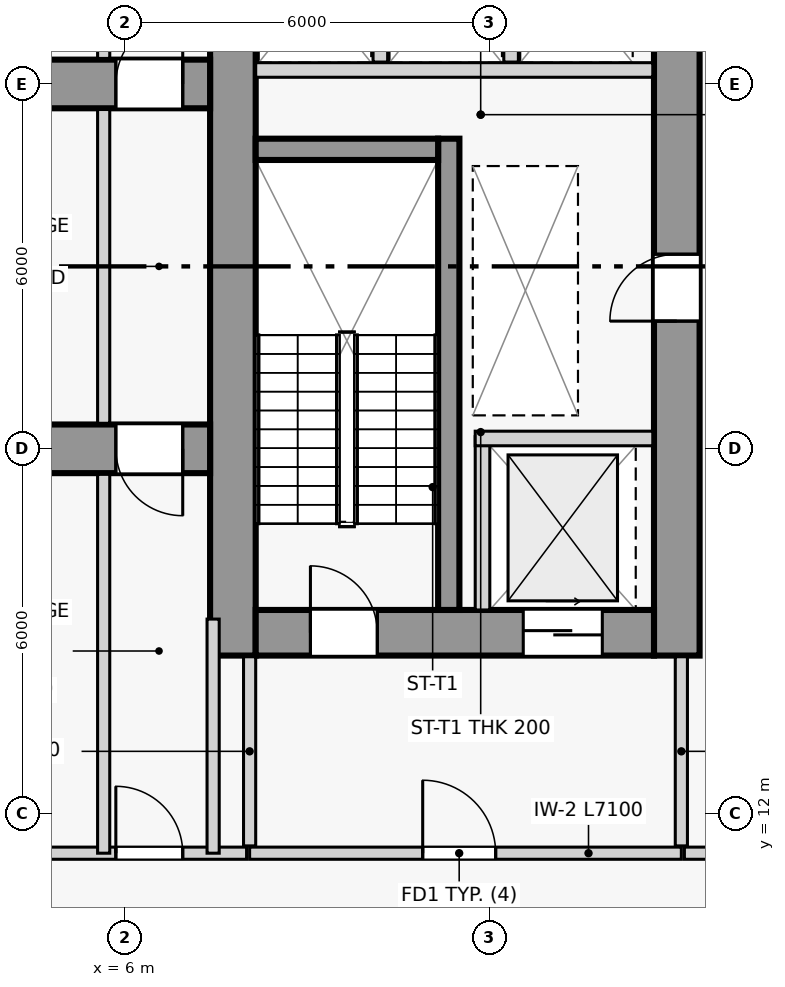
"""IFC4 building model, lengths in metres.
Left out: names, types, materials, properties, quantities, classifications, styles, units other than length and angle.
Written with IfcOpenShell. Run it as: python <this file> out.ifc"""

import sys

from ifc_helpers import new_model, si_unit, direction, frame, frame_2d, origin, place, context, subcontext, project, spatial, rectangle, extrude, source, transform, mapped, element, fill, save


model = new_model("IFC4")
c1 = context("Model", 3, precision=1e-05, world=origin(), true_north=direction((0.0, 1.0)))
c2 = subcontext(c1, "Body", "Model", "MODEL_VIEW")
j1 = project(units=[si_unit("LENGTHUNIT", "METRE"), si_unit("PLANEANGLEUNIT", "RADIAN")], contexts=[c1])
p1 = place(None, origin())
s1 = spatial("IfcSite", under=j1, at=p1, CompositionType="ELEMENT")
p2 = place(p1, origin())
s2 = spatial("IfcBuilding", under=s1, at=p2, CompositionType="ELEMENT")
p3 = place(p2, frame((0.0, 0.0, 148.5)))
s3 = spatial("IfcBuildingStorey", under=s2, at=p3, CompositionType="ELEMENT", Elevation=148.5)
p4 = place(p3, frame((7.775, 14.6, 0.0), z_axis=(0.0, 0.0, 1.0), x_axis=(0.0, 1.0, 0.0)))
e1 = element("IfcWall", 1, at=p4, inside=s3, PredefinedType="SHEAR", context=c2, shape_type="SweptSolid", body=[
    extrude(rectangle(XDim=12.85, YDim=0.75, at=frame_2d((6.425, 0.0))), origin(), (0.0, 0.0, 1.0), 7.2),
])
p5 = place(p3, frame((15.075, 14.6, 0.0), z_axis=(0.0, 0.0, 1.0), x_axis=(0.0, 1.0, 0.0)))
e2 = element("IfcWall", 2, at=p5, inside=s3, PredefinedType="SHEAR", context=c2, shape_type="SweptSolid", body=[
    extrude(rectangle(XDim=12.85, YDim=0.75, at=frame_2d((6.425, 0.0))), origin(), (0.0, 0.0, 1.0), 7.2),
])
p6 = place(p5, frame((5.5, 0.0, 0.0)))
e3 = element("IfcOpeningElement", 3, at=p6, cuts=e2, PredefinedType="OPENING", context=c2, shape_type="SweptSolid", body=[
    extrude(rectangle(XDim=1.1, YDim=2.2, at=frame_2d((0.55, 1.1))), frame((0.0, 0.385, 0.0), z_axis=(0.0, -1.0, 0.0), x_axis=(1.0, 0.0, 0.0)), (0.0, 0.0, 1.0), 0.77),
])
p7 = place(p3, frame((8.15, 14.975, 0.0), z_axis=(0.0, 0.0, 1.0), x_axis=(1.0, 0.0, 0.0)))
e4 = element("IfcWall", 4, at=p7, inside=s3, PredefinedType="SHEAR", context=c2, shape_type="SweptSolid", body=[
    extrude(rectangle(XDim=6.55, YDim=0.75, at=frame_2d((3.275, 0.0))), origin(), (0.0, 0.0, 1.0), 7.2),
])
p8 = place(p7, frame((0.9, 0.0, 0.0)))
e5 = element("IfcOpeningElement", 5, at=p8, cuts=e4, PredefinedType="OPENING", context=c2, shape_type="SweptSolid", body=[
    extrude(rectangle(XDim=1.1, YDim=2.2, at=frame_2d((0.55, 1.1))), frame((0.0, 0.385, 0.0), z_axis=(0.0, -1.0, 0.0), x_axis=(1.0, 0.0, 0.0)), (0.0, 0.0, 1.0), 0.77),
])
p9 = place(p7, frame((4.4, 0.0, 0.0)))
e6 = element("IfcOpeningElement", 6, at=p9, cuts=e4, PredefinedType="OPENING", context=c2, shape_type="SweptSolid", body=[
    extrude(rectangle(XDim=1.3, YDim=2.2, at=frame_2d((0.65, 1.1))), frame((0.0, 0.385, 0.0), z_axis=(0.0, -1.0, 0.0), x_axis=(1.0, 0.0, 0.0)), (0.0, 0.0, 1.0), 0.77),
])
p10 = place(p3, frame((11.325, 15.35, 0.0), z_axis=(0.0, 0.0, 1.0), x_axis=(0.0, 1.0, 0.0)))
e7 = element("IfcWall", 7, at=p10, inside=s3, PredefinedType="SHEAR", context=c2, shape_type="SweptSolid", body=[
    extrude(rectangle(XDim=7.75, YDim=0.35, at=frame_2d((3.875, 0.0))), origin(), (0.0, 0.0, 1.0), 7.2),
])
p11 = place(p3, frame((8.15, 22.925, 0.0), z_axis=(0.0, 0.0, 1.0), x_axis=(1.0, 0.0, 0.0)))
e8 = element("IfcWall", 8, at=p11, inside=s3, PredefinedType="SHEAR", context=c2, shape_type="SweptSolid", body=[
    extrude(rectangle(XDim=3.0, YDim=0.35, at=frame_2d((1.5, 0.0))), origin(), (0.0, 0.0, 1.0), 7.2),
])
p12 = place(p3, frame((0.65, 18.0, 0.0), z_axis=(0.0, 0.0, 1.0), x_axis=(1.0, 0.0, 0.0)))
e9 = element("IfcWall", 9, at=p12, inside=s3, PredefinedType="SOLIDWALL", context=c2, shape_type="SweptSolid", body=[
    extrude(rectangle(XDim=6.75, YDim=0.8, at=frame_2d((3.375, 0.0))), origin(), (0.0, 0.0, 1.0), 6.55),
])
p13 = place(p12, frame((5.2, 0.0, 0.0)))
e10 = element("IfcOpeningElement", 10, at=p13, cuts=e9, PredefinedType="OPENING", context=c2, shape_type="SweptSolid", body=[
    extrude(rectangle(XDim=1.1, YDim=2.2, at=frame_2d((0.55, 1.1))), frame((0.0, 0.41, 0.0), z_axis=(0.0, -1.0, 0.0), x_axis=(1.0, 0.0, 0.0)), (0.0, 0.0, 1.0), 0.82),
])
p14 = place(p3, frame((0.65, 24.0, 0.0), z_axis=(0.0, 0.0, 1.0), x_axis=(1.0, 0.0, 0.0)))
e11 = element("IfcWall", 11, at=p14, inside=s3, PredefinedType="SOLIDWALL", context=c2, shape_type="SweptSolid", body=[
    extrude(rectangle(XDim=6.75, YDim=0.8, at=frame_2d((3.375, 0.0))), origin(), (0.0, 0.0, 1.0), 6.55),
])
p15 = place(p14, frame((5.2, 0.0, 0.0)))
e12 = element("IfcOpeningElement", 12, at=p15, cuts=e11, PredefinedType="OPENING", context=c2, shape_type="SweptSolid", body=[
    extrude(rectangle(XDim=1.1, YDim=2.2, at=frame_2d((0.55, 1.1))), frame((0.0, 0.41, 0.0), z_axis=(0.0, -1.0, 0.0), x_axis=(1.0, 0.0, 0.0)), (0.0, 0.0, 1.0), 0.82),
])
p16 = place(p3, frame((11.88, 15.35, 0.0), z_axis=(0.0, 0.0, 1.0), x_axis=(0.0, 1.0, 0.0)))
e13 = element("IfcWall", 13, at=p16, inside=s3, PredefinedType="PARTITIONING", context=c2, shape_type="SweptSolid", body=[
    extrude(rectangle(XDim=2.85, YDim=0.24, at=frame_2d((1.425, 0.0))), origin(), (0.0, 0.0, 1.0), 6.55),
])
p17 = place(p3, frame((11.76, 18.17, 0.0), z_axis=(0.0, 0.0, 1.0), x_axis=(1.0, 0.0, 0.0)))
e14 = element("IfcWall", 14, at=p17, inside=s3, PredefinedType="PARTITIONING", context=c2, shape_type="SweptSolid", body=[
    extrude(rectangle(XDim=2.92, YDim=0.24, at=frame_2d((1.46, 0.0))), origin(), (0.0, 0.0, 1.0), 6.55),
])
p18 = place(p3, frame((8.05, 11.35, 0.0), z_axis=(0.0, 0.0, 1.0), x_axis=(1.0, 0.0, 0.0)))
e15 = element("IfcWall", 15, at=p18, inside=s3, PredefinedType="PARTITIONING", context=c2, shape_type="SweptSolid", body=[
    extrude(rectangle(XDim=7.1, YDim=0.2, at=frame_2d((3.55, 0.0))), origin(), (0.0, 0.0, 1.0), 4.95),
])
p19 = place(p18, frame((2.846, 0.0, 0.0)))
e16 = element("IfcOpeningElement", 16, at=p19, cuts=e15, PredefinedType="OPENING", context=c2, shape_type="SweptSolid", body=[
    extrude(rectangle(XDim=1.2, YDim=2.2, at=frame_2d((0.6, 1.1))), frame((0.0, 0.11, 0.0), z_axis=(0.0, -1.0, 0.0), x_axis=(1.0, 0.0, 0.0)), (0.0, 0.0, 1.0), 0.22),
])
for number, where, z_axis, x_axis in (
    (17, (8.05, 11.47, 0.0), (0.0, 0.0, 1.0), (0.0, 1.0, 0.0)),
    (18, (15.15, 11.47, 0.0), (0.0, 0.0, 1.0), (0.0, 1.0, 0.0)),
):
    element("IfcWall", number, at=place(p3, frame(where, z_axis=z_axis, x_axis=x_axis)), inside=s3, PredefinedType="PARTITIONING", context=c2, shape_type="SweptSolid", body=[
        extrude(rectangle(XDim=3.11, YDim=0.2, at=frame_2d((1.555, 0.0))), origin(), (0.0, 0.0, 1.0), 6.55),
    ])
p20 = place(p3, frame((8.15, 24.23, 0.0), z_axis=(0.0, 0.0, 1.0), x_axis=(1.0, 0.0, 0.0)))
e19 = element("IfcWall", 19, at=p20, inside=s3, PredefinedType="PARTITIONING", context=c2, shape_type="SweptSolid", body=[
    extrude(rectangle(XDim=6.53, YDim=0.24, at=frame_2d((3.265, 0.0))), origin(), (0.0, 0.0, 1.0), 6.55),
])
for number, where, z_axis, x_axis in (
    (20, (10.2, 24.36, 0.0), (0.0, 0.0, 1.0), (0.0, 1.0, 0.0)),
    (21, (12.35, 24.36, 0.0), (0.0, 0.0, 1.0), (0.0, 1.0, 0.0)),
):
    element("IfcWall", number, at=place(p3, frame(where, z_axis=z_axis, x_axis=x_axis)), inside=s3, PredefinedType="PARTITIONING", context=c2, shape_type="SweptSolid", body=[
        extrude(rectangle(XDim=2.32, YDim=0.24, at=frame_2d((1.16, 0.0))), origin(), (0.0, 0.0, 1.0), 6.55),
    ])
p21 = place(p3, frame((2.2, 11.35, 0.0), z_axis=(0.0, 0.0, 1.0), x_axis=(1.0, 0.0, 0.0)))
e22 = element("IfcWall", 22, at=p21, inside=s3, PredefinedType="PARTITIONING", context=c2, shape_type="SweptSolid", body=[
    extrude(rectangle(XDim=5.8, YDim=0.2, at=frame_2d((2.9, 0.0))), origin(), (0.0, 0.0, 1.0), 4.95),
])
p22 = place(p21, frame((3.65, 0.0, 0.0)))
e23 = element("IfcOpeningElement", 23, at=p22, cuts=e22, PredefinedType="OPENING", context=c2, shape_type="SweptSolid", body=[
    extrude(rectangle(XDim=1.1, YDim=2.2, at=frame_2d((0.55, 1.1))), frame((0.0, 0.11, 0.0), z_axis=(0.0, -1.0, 0.0), x_axis=(1.0, 0.0, 0.0)), (0.0, 0.0, 1.0), 0.22),
])
p23 = place(p3, frame((15.2, 11.35, 0.0), z_axis=(0.0, 0.0, 1.0), x_axis=(1.0, 0.0, 0.0)))
e24 = element("IfcWall", 24, at=p23, inside=s3, PredefinedType="PARTITIONING", context=c2, shape_type="SweptSolid", body=[
    extrude(rectangle(XDim=15.8, YDim=0.2, at=frame_2d((7.9, 0.0))), origin(), (0.0, 0.0, 1.0), 4.95),
])
p24 = place(p3, frame((5.65, 11.35, 0.0), z_axis=(0.0, 0.0, 1.0), x_axis=(0.0, 1.0, 0.0)))
e25 = element("IfcWall", 25, at=p24, inside=s3, PredefinedType="PARTITIONING", context=c2, shape_type="SweptSolid", body=[
    extrude(rectangle(XDim=6.23, YDim=0.2, at=frame_2d((3.115, 0.0))), origin(), (0.0, 0.0, 1.0), 4.95),
])
p25 = place(p3, frame((5.65, 18.42, 0.0), z_axis=(0.0, 0.0, 1.0), x_axis=(0.0, 1.0, 0.0)))
e26 = element("IfcWall", 26, at=p25, inside=s3, PredefinedType="PARTITIONING", context=c2, shape_type="SweptSolid", body=[
    extrude(rectangle(XDim=5.16, YDim=0.2, at=frame_2d((2.58, 0.0))), origin(), (0.0, 0.0, 1.0), 6.55),
])
p26 = place(p3, frame((5.65, 24.42, 0.0), z_axis=(0.0, 0.0, 1.0), x_axis=(0.0, 1.0, 0.0)))
e27 = element("IfcWall", 27, at=p26, inside=s3, PredefinedType="PARTITIONING", context=c2, shape_type="SweptSolid", body=[
    extrude(rectangle(XDim=8.08, YDim=0.2, at=frame_2d((4.04, 0.0))), origin(), (0.0, 0.0, 1.0), 4.95),
])
p27 = place(p3, frame((7.45, 11.35, 0.0), z_axis=(0.0, 0.0, 1.0), x_axis=(0.0, 1.0, 0.0)))
e28 = element("IfcWall", 28, at=p27, inside=s3, PredefinedType="PARTITIONING", context=c2, shape_type="SweptSolid", body=[
    extrude(rectangle(XDim=3.85, YDim=0.2, at=frame_2d((1.925, 0.0))), origin(), (0.0, 0.0, 1.0), 6.55),
])
m1 = source(origin(), c2, "Body", "SweptSolid", [
    extrude(rectangle(XDim=1.1, YDim=2.2, at=frame_2d((0.55, 1.1))), frame((0.0, 0.025, 0.0), z_axis=(0.0, -1.0, 0.0), x_axis=(1.0, 0.0, 0.0)), (0.0, 0.0, 1.0), 0.05),
])
p28 = place(p8, origin())
e29 = element("IfcDoor", 29, at=p28, inside=s3, OperationType="SINGLE_SWING_LEFT", PredefinedType="DOOR", context=c2, shape_type="MappedRepresentation", body=[
    mapped(m1, transform((0.0, 0.0, 0.0), scale=1.0)),
])
fill(e5, e29)
m2 = source(origin(), c2, "Body", "SweptSolid", [
    extrude(rectangle(XDim=1.3, YDim=2.2, at=frame_2d((0.65, 1.1))), frame((0.0, 0.025, 0.0), z_axis=(0.0, -1.0, 0.0), x_axis=(1.0, 0.0, 0.0)), (0.0, 0.0, 1.0), 0.05),
])
p29 = place(p9, origin())
e30 = element("IfcDoor", 30, at=p29, inside=s3, OperationType="SLIDING_TO_RIGHT", PredefinedType="DOOR", context=c2, shape_type="MappedRepresentation", body=[
    mapped(m2, transform((0.0, 0.0, 0.0), scale=1.0)),
])
fill(e6, e30)
m3 = source(origin(), c2, "Body", "SweptSolid", [
    extrude(rectangle(XDim=1.2, YDim=2.2, at=frame_2d((0.6, 1.1))), frame((0.0, 0.025, 0.0), z_axis=(0.0, -1.0, 0.0), x_axis=(1.0, 0.0, 0.0)), (0.0, 0.0, 1.0), 0.05),
])
p30 = place(p19, origin())
e31 = element("IfcDoor", 31, at=p30, inside=s3, OperationType="SINGLE_SWING_LEFT", PredefinedType="DOOR", context=c2, shape_type="MappedRepresentation", body=[
    mapped(m3, transform((0.0, 0.0, 0.0), scale=1.0)),
])
fill(e16, e31)
p31 = place(p6, origin())
e32 = element("IfcDoor", 32, at=p31, inside=s3, OperationType="SINGLE_SWING_LEFT", PredefinedType="DOOR", context=c2, shape_type="MappedRepresentation", body=[
    mapped(m1, transform((0.0, 0.0, 0.0), scale=1.0)),
])
fill(e3, e32)
p32 = place(p13, frame((1.1, 0.0, 0.0), z_axis=(0.0, 0.0, 1.0), x_axis=(-1.0, 0.0, 0.0)))
e33 = element("IfcDoor", 33, at=p32, inside=s3, OperationType="SINGLE_SWING_LEFT", PredefinedType="DOOR", context=c2, shape_type="MappedRepresentation", body=[
    mapped(m1, transform((0.0, 0.0, 0.0), scale=1.0)),
])
fill(e10, e33)
p33 = place(p15, origin())
e34 = element("IfcDoor", 34, at=p33, inside=s3, OperationType="SINGLE_SWING_RIGHT", PredefinedType="DOOR", context=c2, shape_type="MappedRepresentation", body=[
    mapped(m1, transform((0.0, 0.0, 0.0), scale=1.0)),
])
fill(e12, e34)
p34 = place(p22, origin())
e35 = element("IfcDoor", 35, at=p34, inside=s3, OperationType="SINGLE_SWING_LEFT", PredefinedType="DOOR", context=c2, shape_type="MappedRepresentation", body=[
    mapped(m1, transform((0.0, 0.0, 0.0), scale=1.0)),
])
fill(e23, e35)
save(model, sys.argv[1])
